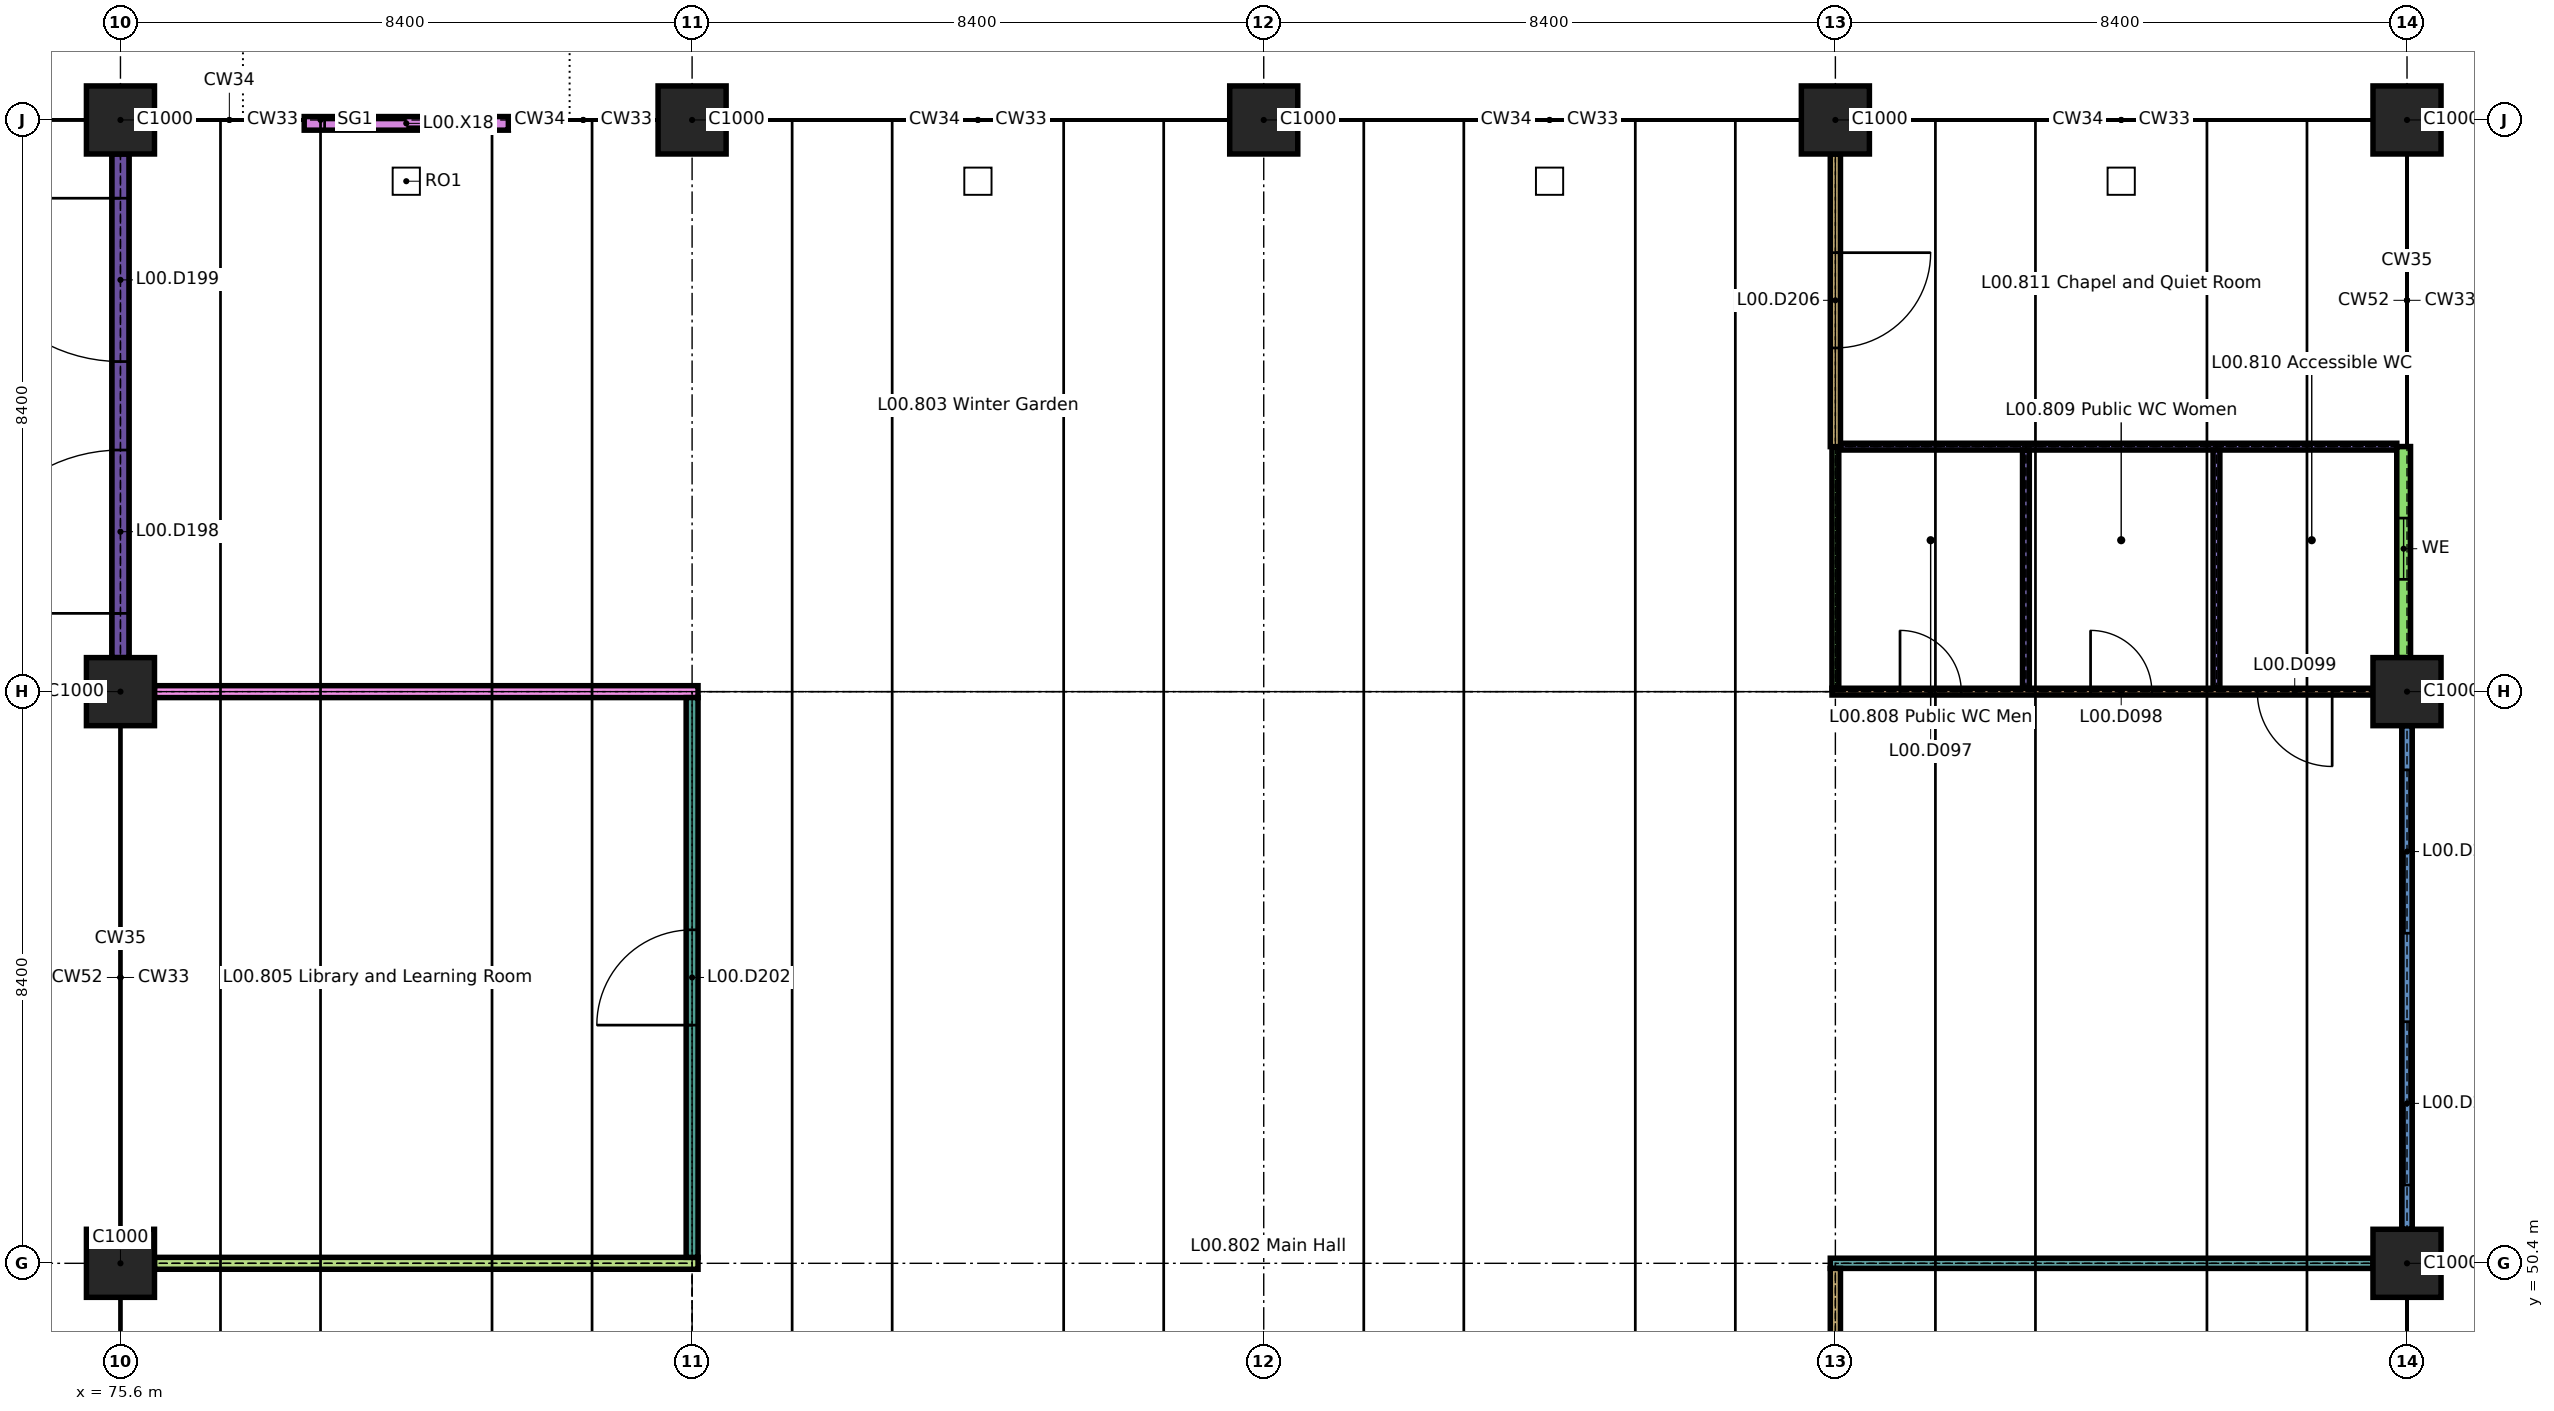
"""IFC4 building model, lengths in metres.
Left out: names, types, materials, properties, quantities, classifications, styles, units other than length and angle.
Written with IfcOpenShell. Run it as: python <this file> out.ifc"""

import sys

from ifc_helpers import new_model, si_unit, direction, frame, frame_2d, origin, origin_2d, place, context, subcontext, project, spatial, rectangle, extrude, element, fill, save


model = new_model("IFC4")
c1 = context("Model", 3, precision=1e-05, world=origin(), true_north=direction((0.0, 1.0)))
c2 = subcontext(c1, "Body", "Model", "MODEL_VIEW")
j1 = project(units=[si_unit("LENGTHUNIT", "METRE"), si_unit("PLANEANGLEUNIT", "RADIAN")], contexts=[c1])
p1 = place(None, origin())
s1 = spatial("IfcSite", under=j1, at=p1, CompositionType="ELEMENT")
p2 = place(p1, origin())
s2 = spatial("IfcBuilding", under=s1, at=p2, CompositionType="ELEMENT")
p3 = place(p2, origin())
s3 = spatial("IfcBuildingStorey", under=s2, at=p3, CompositionType="ELEMENT", Elevation=0.0)
for number, where, z_axis, x_axis in (
    (1, (75.6, 50.4, 0.0), (0.0, 0.0, 1.0), (1.0, 0.0, 0.0)),
    (2, (109.2, 50.4, 0.0), (0.0, 0.0, 1.0), (1.0, 0.0, 0.0)),
    (3, (75.6, 58.8, 0.0), (0.0, 0.0, 1.0), (1.0, 0.0, 0.0)),
    (4, (109.2, 58.8, 0.0), (0.0, 0.0, 1.0), (1.0, 0.0, 0.0)),
    (5, (75.6, 67.2, 0.0), (0.0, 0.0, 1.0), (1.0, 0.0, 0.0)),
    (6, (84.0, 67.2, 0.0), (0.0, 0.0, 1.0), (1.0, 0.0, 0.0)),
    (7, (92.4, 67.2, 0.0), (0.0, 0.0, 1.0), (1.0, 0.0, 0.0)),
    (8, (100.8, 67.2, 0.0), (0.0, 0.0, 1.0), (1.0, 0.0, 0.0)),
    (9, (109.2, 67.2, 0.0), (0.0, 0.0, 1.0), (1.0, 0.0, 0.0)),
):
    element("IfcColumn", number, at=place(p3, frame(where, z_axis=z_axis, x_axis=x_axis)), inside=s3, PredefinedType="COLUMN", context=c2, shape_type="SweptSolid", body=[
        extrude(rectangle(XDim=1.0, YDim=1.0, at=origin_2d()), origin(), (0.0, 0.0, 1.0), 11.312),
    ])
p4 = place(p3, frame((78.3, 67.15, 0.0), z_axis=(0.0, 0.0, 1.0), x_axis=(1.0, 0.0, 0.0)))
e10 = element("IfcWall", 10, at=p4, inside=s3, PredefinedType="SOLIDWALL", context=c2, shape_type="SweptSolid", body=[
    extrude(rectangle(XDim=3.0, YDim=0.2, at=frame_2d((1.5, 0.0))), origin(), (0.0, 0.0, 1.0), 7.317),
])
p5 = place(p4, frame((0.3, 0.0, 0.0)))
e11 = element("IfcOpeningElement", 11, at=p5, cuts=e10, PredefinedType="OPENING", context=c2, shape_type="SweptSolid", body=[
    extrude(rectangle(XDim=2.4, YDim=2.4, at=frame_2d((1.2, 1.2))), frame((0.0, 0.11, 0.0), z_axis=(0.0, -1.0, 0.0), x_axis=(1.0, 0.0, 0.0)), (0.0, 0.0, 1.0), 0.22),
])
p6 = place(p3, frame((109.15, 59.3, 0.0), z_axis=(0.0, 0.0, 1.0), x_axis=(0.0, 1.0, 0.0)))
e12 = element("IfcWall", 12, at=p6, inside=s3, PredefinedType="SOLIDWALL", context=c2, shape_type="SweptSolid", body=[
    extrude(rectangle(XDim=3.1, YDim=0.2, at=frame_2d((1.55, 0.0))), origin(), (0.0, 0.0, 1.0), 8.845),
])
p7 = place(p6, frame((1.15, 0.0, 1.5)))
e13 = element("IfcOpeningElement", 13, at=p7, cuts=e12, PredefinedType="OPENING", context=c2, shape_type="SweptSolid", body=[
    extrude(rectangle(XDim=0.9, YDim=0.6, at=frame_2d((0.45, 0.3))), frame((0.0, 0.11, 0.0), z_axis=(0.0, -1.0, 0.0), x_axis=(1.0, 0.0, 0.0)), (0.0, 0.0, 1.0), 0.22),
])
p8 = place(p3, frame((76.1, 50.4, 0.0), z_axis=(0.0, 0.0, 1.0), x_axis=(1.0, 0.0, 0.0)))
e14 = element("IfcWall", 14, at=p8, inside=s3, PredefinedType="PARTITIONING", context=c2, shape_type="SweptSolid", body=[
    extrude(rectangle(XDim=7.987, YDim=0.175, at=frame_2d((3.994, 0.0))), origin(), (0.0, 0.0, 1.0), 4.2),
])
p9 = place(p3, frame((100.725, 50.4, 0.0), z_axis=(0.0, 0.0, 1.0), x_axis=(1.0, 0.0, 0.0)))
e15 = element("IfcWall", 15, at=p9, inside=s3, PredefinedType="PARTITIONING", context=c2, shape_type="SweptSolid", body=[
    extrude(rectangle(XDim=7.975, YDim=0.15, at=frame_2d((3.987, 0.0))), origin(), (0.0, 0.0, 1.0), 8.55),
])
p10 = place(p3, frame((76.1, 58.8, 0.0), z_axis=(0.0, 0.0, 1.0), x_axis=(1.0, 0.0, 0.0)))
e16 = element("IfcWall", 16, at=p10, inside=s3, PredefinedType="PARTITIONING", context=c2, shape_type="SweptSolid", body=[
    extrude(rectangle(XDim=7.987, YDim=0.175, at=frame_2d((3.994, 0.0))), origin(), (0.0, 0.0, 1.0), 8.555),
])
p11 = place(p3, frame((100.75, 58.8, 0.0), z_axis=(0.0, 0.0, 1.0), x_axis=(1.0, 0.0, 0.0)))
e17 = element("IfcWall", 17, at=p11, inside=s3, PredefinedType="PARTITIONING", context=c2, shape_type="SweptSolid", body=[
    extrude(rectangle(XDim=7.95, YDim=0.1, at=frame_2d((3.975, 0.0))), origin(), (0.0, 0.0, 1.0), 8.54),
])
p12 = place(p11, frame((1.0, 0.0, 0.0)))
e18 = element("IfcOpeningElement", 18, at=p12, cuts=e17, PredefinedType="OPENING", context=c2, shape_type="SweptSolid", body=[
    extrude(rectangle(XDim=0.9, YDim=2.1, at=frame_2d((0.45, 1.05))), frame((0.0, 0.06, 0.0), z_axis=(0.0, -1.0, 0.0), x_axis=(1.0, 0.0, 0.0)), (0.0, 0.0, 1.0), 0.12),
])
p13 = place(p11, frame((3.8, 0.0, 0.0)))
e19 = element("IfcOpeningElement", 19, at=p13, cuts=e17, PredefinedType="OPENING", context=c2, shape_type="SweptSolid", body=[
    extrude(rectangle(XDim=0.9, YDim=2.1, at=frame_2d((0.45, 1.05))), frame((0.0, 0.06, 0.0), z_axis=(0.0, -1.0, 0.0), x_axis=(1.0, 0.0, 0.0)), (0.0, 0.0, 1.0), 0.12),
])
p14 = place(p11, frame((6.25, 0.0, 0.0)))
e20 = element("IfcOpeningElement", 20, at=p14, cuts=e17, PredefinedType="OPENING", context=c2, shape_type="SweptSolid", body=[
    extrude(rectangle(XDim=1.1, YDim=2.1, at=frame_2d((0.55, 1.05))), frame((0.0, 0.06, 0.0), z_axis=(0.0, -1.0, 0.0), x_axis=(1.0, 0.0, 0.0)), (0.0, 0.0, 1.0), 0.12),
])
p15 = place(p3, frame((100.875, 62.4, 0.0), z_axis=(0.0, 0.0, 1.0), x_axis=(1.0, 0.0, 0.0)))
e21 = element("IfcWall", 21, at=p15, inside=s3, PredefinedType="PARTITIONING", context=c2, shape_type="SweptSolid", body=[
    extrude(rectangle(XDim=8.175, YDim=0.1, at=frame_2d((4.087, 0.0))), origin(), (0.0, 0.0, 1.0), 4.2),
])
p16 = place(p3, frame((75.6, 59.3, 0.0), z_axis=(0.0, 0.0, 1.0), x_axis=(0.0, 1.0, 0.0)))
e22 = element("IfcWall", 22, at=p16, inside=s3, PredefinedType="SOLIDWALL", context=c2, shape_type="SweptSolid", body=[
    extrude(rectangle(XDim=7.4, YDim=0.25, at=frame_2d((3.7, 0.0))), origin(), (0.0, 0.0, 1.0), 8.845),
])
p17 = place(p16, frame((0.65, 0.0, 0.0)))
e23 = element("IfcOpeningElement", 23, at=p17, cuts=e22, PredefinedType="OPENING", context=c2, shape_type="SweptSolid", body=[
    extrude(rectangle(XDim=2.4, YDim=2.4, at=frame_2d((1.2, 1.2))), frame((0.0, 0.135, 0.0), z_axis=(0.0, -1.0, 0.0), x_axis=(1.0, 0.0, 0.0)), (0.0, 0.0, 1.0), 0.27),
])
p18 = place(p16, frame((4.35, 0.0, 0.0)))
e24 = element("IfcOpeningElement", 24, at=p18, cuts=e22, PredefinedType="OPENING", context=c2, shape_type="SweptSolid", body=[
    extrude(rectangle(XDim=2.4, YDim=2.4, at=frame_2d((1.2, 1.2))), frame((0.0, 0.135, 0.0), z_axis=(0.0, -1.0, 0.0), x_axis=(1.0, 0.0, 0.0)), (0.0, 0.0, 1.0), 0.27),
])
p19 = place(p3, frame((84.0, 50.488, 0.0), z_axis=(0.0, 0.0, 1.0), x_axis=(0.0, 1.0, 0.0)))
e25 = element("IfcWall", 25, at=p19, inside=s3, PredefinedType="PARTITIONING", context=c2, shape_type="SweptSolid", body=[
    extrude(rectangle(XDim=8.225, YDim=0.175, at=frame_2d((4.112, 0.0))), origin(), (0.0, 0.0, 1.0), 11.717),
])
p20 = place(p19, frame((3.413, 0.0, 0.0)))
e26 = element("IfcOpeningElement", 26, at=p20, cuts=e25, PredefinedType="OPENING", context=c2, shape_type="SweptSolid", body=[
    extrude(rectangle(XDim=1.4, YDim=2.1, at=frame_2d((0.7, 1.05))), frame((0.0, 0.097, 0.0), z_axis=(0.0, -1.0, 0.0), x_axis=(1.0, 0.0, 0.0)), (0.0, 0.0, 1.0), 0.195),
])
p21 = place(p3, frame((100.8, 47.475, 0.0), z_axis=(0.0, 0.0, 1.0), x_axis=(0.0, 1.0, 0.0)))
e27 = element("IfcWall", 27, at=p21, inside=s3, PredefinedType="PARTITIONING", context=c2, shape_type="SweptSolid", body=[
    extrude(rectangle(XDim=2.85, YDim=0.15, at=frame_2d((1.425, 0.0))), origin(), (0.0, 0.0, 1.0), 11.717),
])
p22 = place(p3, frame((100.8, 58.85, 0.0), z_axis=(0.0, 0.0, 1.0), x_axis=(0.0, 1.0, 0.0)))
e28 = element("IfcWall", 28, at=p22, inside=s3, PredefinedType="PARTITIONING", context=c2, shape_type="SweptSolid", body=[
    extrude(rectangle(XDim=3.55, YDim=0.1, at=frame_2d((1.775, 0.0))), origin(), (0.0, 0.0, 1.0), 11.717),
])
p23 = place(p3, frame((100.8, 62.4, 0.0), z_axis=(0.0, 0.0, 1.0), x_axis=(0.0, 1.0, 0.0)))
e29 = element("IfcWall", 29, at=p23, inside=s3, PredefinedType="PARTITIONING", context=c2, shape_type="SweptSolid", body=[
    extrude(rectangle(XDim=4.3, YDim=0.15, at=frame_2d((2.15, 0.0))), origin(), (0.0, 0.0, 1.0), 11.717),
])
p24 = place(p23, frame((1.45, 0.0, 0.0)))
e30 = element("IfcOpeningElement", 30, at=p24, cuts=e29, PredefinedType="OPENING", context=c2, shape_type="SweptSolid", body=[
    extrude(rectangle(XDim=1.4, YDim=2.1, at=frame_2d((0.7, 1.05))), frame((0.0, 0.085, 0.0), z_axis=(0.0, -1.0, 0.0), x_axis=(1.0, 0.0, 0.0)), (0.0, 0.0, 1.0), 0.17),
])
for number, where, z_axis, x_axis in (
    (31, (103.6, 58.85, 0.0), (0.0, 0.0, 1.0), (0.0, 1.0, 0.0)),
    (32, (106.4, 58.85, 0.0), (0.0, 0.0, 1.0), (0.0, 1.0, 0.0)),
):
    element("IfcWall", number, at=place(p3, frame(where, z_axis=z_axis, x_axis=x_axis)), inside=s3, PredefinedType="PARTITIONING", context=c2, shape_type="SweptSolid", body=[
        extrude(rectangle(XDim=3.5, YDim=0.1, at=frame_2d((1.75, 0.0))), origin(), (0.0, 0.0, 1.0), 4.2),
    ])
p25 = place(p3, frame((109.2, 50.9, 0.0), z_axis=(0.0, 0.0, 1.0), x_axis=(0.0, 1.0, 0.0)))
e33 = element("IfcWall", 33, at=p25, inside=s3, PredefinedType="PARTITIONING", context=c2, shape_type="SweptSolid", body=[
    extrude(rectangle(XDim=7.4, YDim=0.15, at=frame_2d((3.7, 0.0))), origin(), (0.0, 0.0, 1.0), 8.845),
])
p26 = place(p25, frame((0.65, 0.0, 0.0)))
e34 = element("IfcOpeningElement", 34, at=p26, cuts=e33, PredefinedType="OPENING", context=c2, shape_type="SweptSolid", body=[
    extrude(rectangle(XDim=2.4, YDim=2.4, at=frame_2d((1.2, 1.2))), frame((0.0, 0.085, 0.0), z_axis=(0.0, -1.0, 0.0), x_axis=(1.0, 0.0, 0.0)), (0.0, 0.0, 1.0), 0.17),
])
p27 = place(p25, frame((4.35, 0.0, 0.0)))
e35 = element("IfcOpeningElement", 35, at=p27, cuts=e33, PredefinedType="OPENING", context=c2, shape_type="SweptSolid", body=[
    extrude(rectangle(XDim=2.4, YDim=2.4, at=frame_2d((1.2, 1.2))), frame((0.0, 0.085, 0.0), z_axis=(0.0, -1.0, 0.0), x_axis=(1.0, 0.0, 0.0)), (0.0, 0.0, 1.0), 0.17),
])
p28 = place(p3, frame((109.2, 50.9, 9.155), z_axis=(0.0, 0.0, 1.0), x_axis=(0.0, 1.0, 0.0)))
e36 = element("IfcWall", 36, at=p28, inside=s3, PredefinedType="PARTITIONING", context=c2, shape_type="SweptSolid", body=[
    extrude(rectangle(XDim=7.4, YDim=0.15, at=frame_2d((3.7, 0.0))), origin(), (0.0, 0.0, 1.0), 1.66),
])
p29 = place(p3, frame((109.15, 59.3, 9.155), z_axis=(0.0, 0.0, 1.0), x_axis=(0.0, 1.0, 0.0)))
e37 = element("IfcWall", 37, at=p29, inside=s3, PredefinedType="SOLIDWALL", context=c2, shape_type="SweptSolid", body=[
    extrude(rectangle(XDim=3.1, YDim=0.2, at=frame_2d((1.55, 0.0))), origin(), (0.0, 0.0, 1.0), 1.66),
])
p30 = place(p3, frame((75.6, 59.3, 9.155), z_axis=(0.0, 0.0, 1.0), x_axis=(0.0, 1.0, 0.0)))
e38 = element("IfcWall", 38, at=p30, inside=s3, PredefinedType="SOLIDWALL", context=c2, shape_type="SweptSolid", body=[
    extrude(rectangle(XDim=7.4, YDim=0.25, at=frame_2d((3.7, 0.0))), origin(), (0.0, 0.0, 1.0), 1.66),
])
p31 = place(p5, origin())
e39 = element("IfcDoor", 39, at=p31, inside=s3, OperationType="DOUBLE_DOOR_SLIDING", PredefinedType="DOOR", context=c2, shape_type="SweptSolid", body=[
    extrude(rectangle(XDim=2.4, YDim=2.4, at=frame_2d((1.2, 1.2))), frame((0.0, 0.025, 0.0), z_axis=(0.0, -1.0, 0.0), x_axis=(1.0, 0.0, 0.0)), (0.0, 0.0, 1.0), 0.05),
])
fill(e11, e39)
p32 = place(p7, origin())
e40 = element("IfcWindow", 40, at=p32, inside=s3, PartitioningType="SINGLE_PANEL", PredefinedType="WINDOW", context=c2, shape_type="SweptSolid", body=[
    extrude(rectangle(XDim=0.9, YDim=0.6, at=frame_2d((0.45, 0.3))), frame((0.0, 0.03, 0.0), z_axis=(0.0, -1.0, 0.0), x_axis=(1.0, 0.0, 0.0)), (0.0, 0.0, 1.0), 0.06),
])
fill(e13, e40)
p33 = place(p12, origin())
e41 = element("IfcDoor", 41, at=p33, inside=s3, OperationType="SINGLE_SWING_RIGHT", PredefinedType="DOOR", context=c2, shape_type="SweptSolid", body=[
    extrude(rectangle(XDim=0.9, YDim=2.1, at=frame_2d((0.45, 1.05))), frame((0.0, 0.02, 0.0), z_axis=(0.0, -1.0, 0.0), x_axis=(1.0, 0.0, 0.0)), (0.0, 0.0, 1.0), 0.04),
])
fill(e18, e41)
p34 = place(p13, origin())
e42 = element("IfcDoor", 42, at=p34, inside=s3, OperationType="SINGLE_SWING_RIGHT", PredefinedType="DOOR", context=c2, shape_type="SweptSolid", body=[
    extrude(rectangle(XDim=0.9, YDim=2.1, at=frame_2d((0.45, 1.05))), frame((0.0, 0.02, 0.0), z_axis=(0.0, -1.0, 0.0), x_axis=(1.0, 0.0, 0.0)), (0.0, 0.0, 1.0), 0.04),
])
fill(e19, e42)
p35 = place(p14, origin())
e43 = element("IfcDoor", 43, at=p35, inside=s3, OperationType="SINGLE_SWING_RIGHT", PredefinedType="DOOR", context=c2, shape_type="SweptSolid", body=[
    extrude(rectangle(XDim=1.1, YDim=2.1, at=frame_2d((0.55, 1.05))), frame((0.0, 0.025, 0.0), z_axis=(0.0, -1.0, 0.0), x_axis=(1.0, 0.0, 0.0)), (0.0, 0.0, 1.0), 0.05),
])
fill(e20, e43)
p36 = place(p17, origin())
e44 = element("IfcDoor", 44, at=p36, inside=s3, OperationType="SINGLE_SWING_RIGHT", PredefinedType="DOOR", context=c2, shape_type="SweptSolid", body=[
    extrude(rectangle(XDim=2.4, YDim=2.4, at=frame_2d((1.2, 1.2))), frame((0.0, 0.025, 0.0), z_axis=(0.0, -1.0, 0.0), x_axis=(1.0, 0.0, 0.0)), (0.0, 0.0, 1.0), 0.05),
])
fill(e23, e44)
p37 = place(p18, origin())
e45 = element("IfcDoor", 45, at=p37, inside=s3, OperationType="SINGLE_SWING_LEFT", PredefinedType="DOOR", context=c2, shape_type="SweptSolid", body=[
    extrude(rectangle(XDim=2.4, YDim=2.4, at=frame_2d((1.2, 1.2))), frame((0.0, 0.025, 0.0), z_axis=(0.0, -1.0, 0.0), x_axis=(1.0, 0.0, 0.0)), (0.0, 0.0, 1.0), 0.05),
])
fill(e24, e45)
p38 = place(p20, origin())
e46 = element("IfcDoor", 46, at=p38, inside=s3, OperationType="SINGLE_SWING_RIGHT", PredefinedType="DOOR", context=c2, shape_type="SweptSolid", body=[
    extrude(rectangle(XDim=1.4, YDim=2.1, at=frame_2d((0.7, 1.05))), frame((0.0, 0.025, 0.0), z_axis=(0.0, -1.0, 0.0), x_axis=(1.0, 0.0, 0.0)), (0.0, 0.0, 1.0), 0.05),
])
fill(e26, e46)
p39 = place(p24, origin())
e47 = element("IfcDoor", 47, at=p39, inside=s3, OperationType="SINGLE_SWING_RIGHT", PredefinedType="DOOR", context=c2, shape_type="SweptSolid", body=[
    extrude(rectangle(XDim=1.4, YDim=2.1, at=frame_2d((0.7, 1.05))), frame((0.0, 0.025, 0.0), z_axis=(0.0, -1.0, 0.0), x_axis=(1.0, 0.0, 0.0)), (0.0, 0.0, 1.0), 0.05),
])
fill(e30, e47)
p40 = place(p26, origin())
e48 = element("IfcDoor", 48, at=p40, inside=s3, OperationType="DOUBLE_DOOR_SLIDING", PredefinedType="DOOR", context=c2, shape_type="SweptSolid", body=[
    extrude(rectangle(XDim=2.4, YDim=2.4, at=frame_2d((1.2, 1.2))), frame((0.0, 0.025, 0.0), z_axis=(0.0, -1.0, 0.0), x_axis=(1.0, 0.0, 0.0)), (0.0, 0.0, 1.0), 0.05),
])
fill(e34, e48)
p41 = place(p27, origin())
e49 = element("IfcDoor", 49, at=p41, inside=s3, OperationType="DOUBLE_DOOR_SLIDING", PredefinedType="DOOR", context=c2, shape_type="SweptSolid", body=[
    extrude(rectangle(XDim=2.4, YDim=2.4, at=frame_2d((1.2, 1.2))), frame((0.0, 0.025, 0.0), z_axis=(0.0, -1.0, 0.0), x_axis=(1.0, 0.0, 0.0)), (0.0, 0.0, 1.0), 0.05),
])
fill(e35, e49)
save(model, sys.argv[1])
